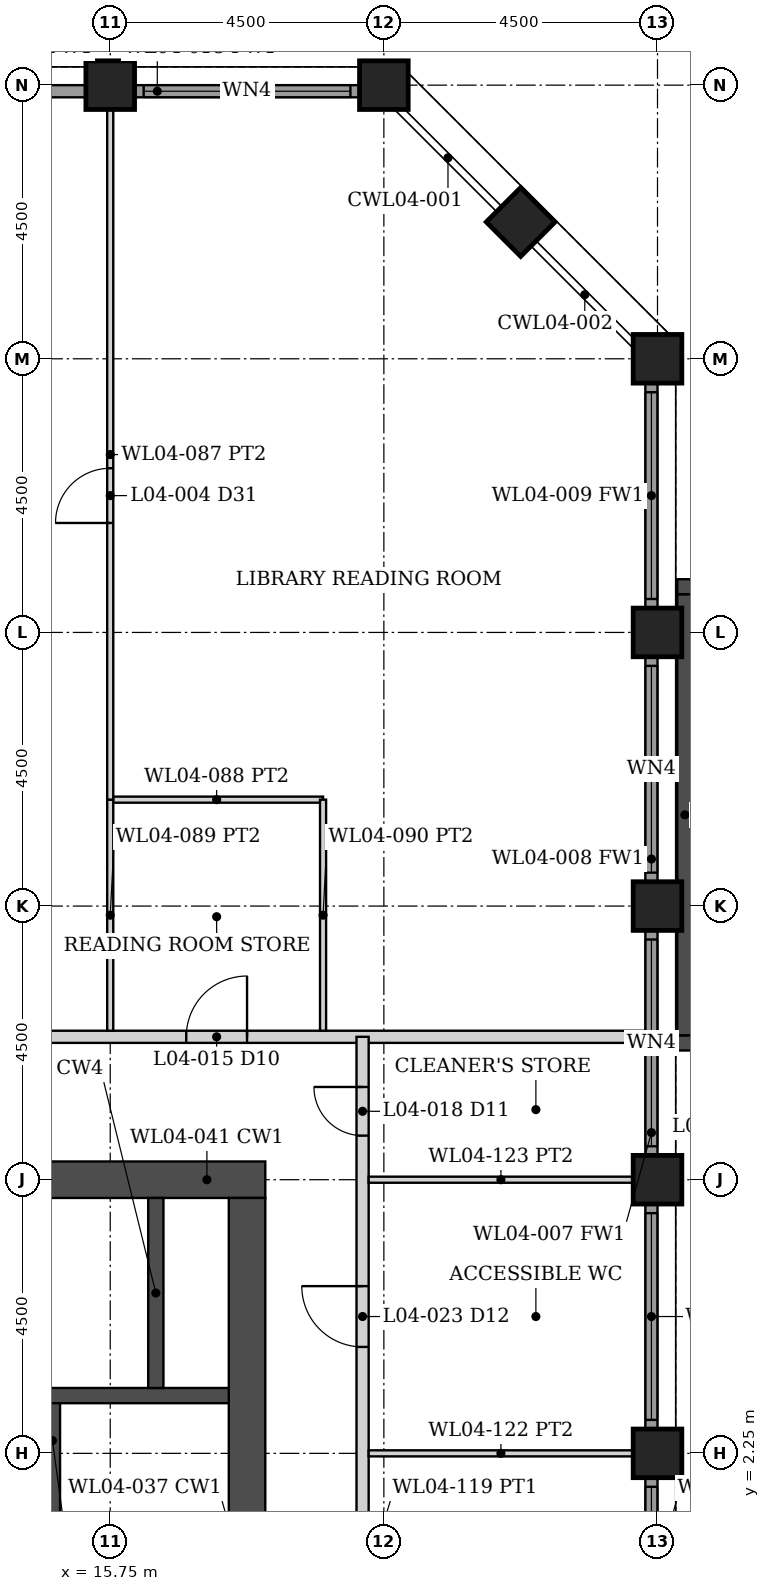
"""IFC4 building model, lengths in metres.
Left out: names, types, materials, properties, quantities, classifications, styles, units other than length and angle.
Written with IfcOpenShell. Run it as: python <this file> out.ifc"""

import sys

from ifc_helpers import new_model, si_unit, direction, frame, frame_2d, origin, origin_2d, place, context, subcontext, project, spatial, rectangle, hollow_rectangle, extrude, element, fill, save


model = new_model("IFC4")
c1 = context("Model", 3, precision=1e-05, world=origin(), true_north=direction((0.0, 1.0)))
c2 = subcontext(c1, "Body", "Model", "MODEL_VIEW")
j1 = project(units=[si_unit("LENGTHUNIT", "METRE"), si_unit("PLANEANGLEUNIT", "RADIAN")], contexts=[c1])
p1 = place(None, origin())
s1 = spatial("IfcSite", under=j1, at=p1, CompositionType="ELEMENT")
p2 = place(p1, origin())
s2 = spatial("IfcBuilding", under=s1, at=p2, CompositionType="ELEMENT")
p3 = place(p2, frame((0.0, 0.0, 21.5)))
s3 = spatial("IfcBuildingStorey", under=s2, at=p3, CompositionType="ELEMENT", Elevation=21.5)
for number, where, z_axis, x_axis in (
    (1, (24.75, 2.25, 0.0), (0.0, 0.0, 1.0), (1.0, 0.0, 0.0)),
    (2, (24.75, 6.75, 0.0), (0.0, 0.0, 1.0), (1.0, 0.0, 0.0)),
    (3, (24.75, 11.25, 0.0), (0.0, 0.0, 1.0), (1.0, 0.0, 0.0)),
    (4, (15.75, 24.75, 0.0), (0.0, 0.0, 1.0), (0.0, 1.0, 0.0)),
    (5, (24.75, 15.75, 0.0), (0.0, 0.0, 1.0), (1.0, 0.0, 0.0)),
    (6, (20.25, 24.75, 0.0), (0.0, 0.0, 1.0), (0.0, 1.0, 0.0)),
    (7, (24.75, 20.25, 0.0), (0.0, 0.0, 1.0), (1.0, 0.0, 0.0)),
    (8, (22.5, 22.5, 0.0), (0.0, 0.0, 1.0), (0.707, 0.707, 0.0)),
):
    element("IfcColumn", number, at=place(p3, frame(where, z_axis=z_axis, x_axis=x_axis)), inside=s3, PredefinedType="COLUMN", context=c2, shape_type="SweptSolid", body=[
        extrude(hollow_rectangle(XDim=0.8, YDim=0.8, WallThickness=0.08, at=origin_2d()), origin(), (0.0, 0.0, 1.0), 5.0),
    ])
p4 = place(p3, frame((8.7, 6.75, 0.0), z_axis=(0.0, 0.0, 1.0), x_axis=(1.0, 0.0, 0.0)))
e9 = element("IfcWall", 9, at=p4, inside=s3, PredefinedType="SHEAR", context=c2, shape_type="SweptSolid", body=[
    extrude(rectangle(XDim=9.6, YDim=0.6, at=frame_2d((4.8, 0.0))), origin(), (0.0, 0.0, 1.0), 5.0),
])
p5 = place(p3, frame((18.0, -6.45, 0.0), z_axis=(0.0, 0.0, 1.0), x_axis=(0.0, 1.0, 0.0)))
e10 = element("IfcWall", 10, at=p5, inside=s3, PredefinedType="SHEAR", context=c2, shape_type="SweptSolid", body=[
    extrude(rectangle(XDim=12.9, YDim=0.6, at=frame_2d((6.45, 0.0))), origin(), (0.0, 0.0, 1.0), 5.0),
])
p6 = place(p3, frame((9.3, 3.2, 0.0), z_axis=(0.0, 0.0, 1.0), x_axis=(1.0, 0.0, 0.0)))
e11 = element("IfcWall", 11, at=p6, inside=s3, PredefinedType="SHEAR", context=c2, shape_type="SweptSolid", body=[
    extrude(rectangle(XDim=8.4, YDim=0.25, at=frame_2d((4.2, 0.0))), origin(), (0.0, 0.0, 1.0), 5.0),
])
p7 = place(p3, frame((16.5, 3.325, 0.0), z_axis=(0.0, 0.0, 1.0), x_axis=(0.0, 1.0, 0.0)))
e12 = element("IfcWall", 12, at=p7, inside=s3, PredefinedType="SHEAR", context=c2, shape_type="SweptSolid", body=[
    extrude(rectangle(XDim=3.125, YDim=0.25, at=frame_2d((1.562, 0.0))), origin(), (0.0, 0.0, 1.0), 5.0),
])
p8 = place(p3, frame((14.8, -3.075, 0.0), z_axis=(0.0, 0.0, 1.0), x_axis=(0.0, 1.0, 0.0)))
e13 = element("IfcWall", 13, at=p8, inside=s3, PredefinedType="SHEAR", context=c2, shape_type="SweptSolid", body=[
    extrude(rectangle(XDim=6.15, YDim=0.25, at=frame_2d((3.075, 0.0))), origin(), (0.0, 0.0, 1.0), 5.0),
])
p9 = place(p3, frame((25.075, 9.0, 0.0), z_axis=(0.0, 0.0, 1.0), x_axis=(1.0, 0.0, 0.0)))
e14 = element("IfcWall", 14, at=p9, inside=s3, PredefinedType="SHEAR", context=c2, shape_type="SweptSolid", body=[
    extrude(rectangle(XDim=3.55, YDim=0.25, at=frame_2d((1.775, 0.0))), origin(), (0.0, 0.0, 1.0), 5.0),
])
p10 = place(p9, frame((0.475, 0.0, 0.0)))
e15 = element("IfcOpeningElement", 15, at=p10, cuts=e14, PredefinedType="OPENING", context=c2, shape_type="SweptSolid", body=[
    extrude(rectangle(XDim=1.2, YDim=2.2, at=frame_2d((0.6, 1.1))), frame((0.0, 0.135, 0.0), z_axis=(0.0, -1.0, 0.0), x_axis=(1.0, 0.0, 0.0)), (0.0, 0.0, 1.0), 0.27),
])
p11 = place(p3, frame((25.075, 16.5, 0.0), z_axis=(0.0, 0.0, 1.0), x_axis=(1.0, 0.0, 0.0)))
e16 = element("IfcWall", 16, at=p11, inside=s3, PredefinedType="SHEAR", context=c2, shape_type="SweptSolid", body=[
    extrude(rectangle(XDim=3.55, YDim=0.25, at=frame_2d((1.775, 0.0))), origin(), (0.0, 0.0, 1.0), 5.0),
])
p12 = place(p3, frame((25.2, 9.125, 0.0), z_axis=(0.0, 0.0, 1.0), x_axis=(0.0, 1.0, 0.0)))
e17 = element("IfcWall", 17, at=p12, inside=s3, PredefinedType="SHEAR", context=c2, shape_type="SweptSolid", body=[
    extrude(rectangle(XDim=7.25, YDim=0.25, at=frame_2d((3.625, 0.0))), origin(), (0.0, 0.0, 1.0), 5.0),
])
p13 = place(p3, frame((24.65, -1.845, 0.0), z_axis=(0.0, 0.0, 1.0), x_axis=(0.0, 1.0, 0.0)))
e18 = element("IfcWall", 18, at=p13, inside=s3, PredefinedType="SOLIDWALL", context=c2, shape_type="SweptSolid", body=[
    extrude(rectangle(XDim=3.69, YDim=0.2, at=frame_2d((1.845, 0.0))), origin(), (0.0, 0.0, 1.0), 3.879),
])
p14 = place(p13, frame((0.145, 0.0, 0.3)))
e19 = element("IfcOpeningElement", 19, at=p14, cuts=e18, PredefinedType="OPENING", context=c2, shape_type="SweptSolid", body=[
    extrude(rectangle(XDim=3.4, YDim=3.429, at=frame_2d((1.7, 1.714))), frame((0.0, 0.11, 0.0), z_axis=(0.0, -1.0, 0.0), x_axis=(1.0, 0.0, 0.0)), (0.0, 0.0, 1.0), 0.22),
])
p15 = place(p3, frame((24.65, 2.655, 0.0), z_axis=(0.0, 0.0, 1.0), x_axis=(0.0, 1.0, 0.0)))
e20 = element("IfcWall", 20, at=p15, inside=s3, PredefinedType="SOLIDWALL", context=c2, shape_type="SweptSolid", body=[
    extrude(rectangle(XDim=3.69, YDim=0.2, at=frame_2d((1.845, 0.0))), origin(), (0.0, 0.0, 1.0), 3.879),
])
p16 = place(p15, frame((0.145, 0.0, 0.3)))
e21 = element("IfcOpeningElement", 21, at=p16, cuts=e20, PredefinedType="OPENING", context=c2, shape_type="SweptSolid", body=[
    extrude(rectangle(XDim=3.4, YDim=3.429, at=frame_2d((1.7, 1.714))), frame((0.0, 0.11, 0.0), z_axis=(0.0, -1.0, 0.0), x_axis=(1.0, 0.0, 0.0)), (0.0, 0.0, 1.0), 0.22),
])
p17 = place(p3, frame((24.65, 7.155, 0.0), z_axis=(0.0, 0.0, 1.0), x_axis=(0.0, 1.0, 0.0)))
e22 = element("IfcWall", 22, at=p17, inside=s3, PredefinedType="SOLIDWALL", context=c2, shape_type="SweptSolid", body=[
    extrude(rectangle(XDim=3.69, YDim=0.2, at=frame_2d((1.845, 0.0))), origin(), (0.0, 0.0, 1.0), 3.879),
])
p18 = place(p17, frame((0.145, 0.0, 0.3)))
e23 = element("IfcOpeningElement", 23, at=p18, cuts=e22, PredefinedType="OPENING", context=c2, shape_type="SweptSolid", body=[
    extrude(rectangle(XDim=3.4, YDim=3.429, at=frame_2d((1.7, 1.714))), frame((0.0, 0.11, 0.0), z_axis=(0.0, -1.0, 0.0), x_axis=(1.0, 0.0, 0.0)), (0.0, 0.0, 1.0), 0.22),
])
p19 = place(p3, frame((24.65, 11.655, 0.0), z_axis=(0.0, 0.0, 1.0), x_axis=(0.0, 1.0, 0.0)))
e24 = element("IfcWall", 24, at=p19, inside=s3, PredefinedType="SOLIDWALL", context=c2, shape_type="SweptSolid", body=[
    extrude(rectangle(XDim=3.69, YDim=0.2, at=frame_2d((1.845, 0.0))), origin(), (0.0, 0.0, 1.0), 3.879),
])
p20 = place(p19, frame((0.145, 0.0, 0.3)))
e25 = element("IfcOpeningElement", 25, at=p20, cuts=e24, PredefinedType="OPENING", context=c2, shape_type="SweptSolid", body=[
    extrude(rectangle(XDim=3.4, YDim=3.429, at=frame_2d((1.7, 1.714))), frame((0.0, 0.11, 0.0), z_axis=(0.0, -1.0, 0.0), x_axis=(1.0, 0.0, 0.0)), (0.0, 0.0, 1.0), 0.22),
])
p21 = place(p3, frame((24.65, 16.155, 0.0), z_axis=(0.0, 0.0, 1.0), x_axis=(0.0, 1.0, 0.0)))
e26 = element("IfcWall", 26, at=p21, inside=s3, PredefinedType="SOLIDWALL", context=c2, shape_type="SweptSolid", body=[
    extrude(rectangle(XDim=3.69, YDim=0.2, at=frame_2d((1.845, 0.0))), origin(), (0.0, 0.0, 1.0), 3.879),
])
p22 = place(p21, frame((0.145, 0.0, 0.3)))
e27 = element("IfcOpeningElement", 27, at=p22, cuts=e26, PredefinedType="OPENING", context=c2, shape_type="SweptSolid", body=[
    extrude(rectangle(XDim=3.4, YDim=3.429, at=frame_2d((1.7, 1.714))), frame((0.0, 0.11, 0.0), z_axis=(0.0, -1.0, 0.0), x_axis=(1.0, 0.0, 0.0)), (0.0, 0.0, 1.0), 0.22),
])
p23 = place(p3, frame((11.655, 24.65, 0.0), z_axis=(0.0, 0.0, 1.0), x_axis=(1.0, 0.0, 0.0)))
e28 = element("IfcWall", 28, at=p23, inside=s3, PredefinedType="SOLIDWALL", context=c2, shape_type="SweptSolid", body=[
    extrude(rectangle(XDim=3.69, YDim=0.2, at=frame_2d((1.845, 0.0))), origin(), (0.0, 0.0, 1.0), 3.879),
])
p24 = place(p23, frame((0.945, 0.0, 0.0)))
e29 = element("IfcOpeningElement", 29, at=p24, cuts=e28, PredefinedType="OPENING", context=c2, shape_type="SweptSolid", body=[
    extrude(rectangle(XDim=1.8, YDim=2.4, at=frame_2d((0.9, 1.2))), frame((0.0, 0.11, 0.0), z_axis=(0.0, -1.0, 0.0), x_axis=(1.0, 0.0, 0.0)), (0.0, 0.0, 1.0), 0.22),
])
p25 = place(p3, frame((16.155, 24.65, 0.0), z_axis=(0.0, 0.0, 1.0), x_axis=(1.0, 0.0, 0.0)))
e30 = element("IfcWall", 30, at=p25, inside=s3, PredefinedType="SOLIDWALL", context=c2, shape_type="SweptSolid", body=[
    extrude(rectangle(XDim=3.69, YDim=0.2, at=frame_2d((1.845, 0.0))), origin(), (0.0, 0.0, 1.0), 3.879),
])
p26 = place(p25, frame((0.145, 0.0, 0.3)))
e31 = element("IfcOpeningElement", 31, at=p26, cuts=e30, PredefinedType="OPENING", context=c2, shape_type="SweptSolid", body=[
    extrude(rectangle(XDim=3.4, YDim=3.429, at=frame_2d((1.7, 1.714))), frame((0.0, 0.11, 0.0), z_axis=(0.0, -1.0, 0.0), x_axis=(1.0, 0.0, 0.0)), (0.0, 0.0, 1.0), 0.22),
])
p27 = place(p3, frame((-24.55, 9.1, 0.0), z_axis=(0.0, 0.0, 1.0), x_axis=(1.0, 0.0, 0.0)))
e32 = element("IfcWall", 32, at=p27, inside=s3, PredefinedType="PARTITIONING", context=c2, shape_type="SweptSolid", body=[
    extrude(rectangle(XDim=49.1, YDim=0.2, at=frame_2d((24.55, 0.0))), origin(), (0.0, 0.0, 1.0), 3.873),
])
p28 = place(p27, frame((6.684, 0.0, 0.0)))
e33 = element("IfcOpeningElement", 33, at=p28, cuts=e32, PredefinedType="OPENING", context=c2, shape_type="SweptSolid", body=[
    extrude(rectangle(XDim=0.9, YDim=2.1, at=frame_2d((0.45, 1.05))), frame((0.0, 0.11, 0.0), z_axis=(0.0, -1.0, 0.0), x_axis=(1.0, 0.0, 0.0)), (0.0, 0.0, 1.0), 0.22),
])
p29 = place(p27, frame((14.06, 0.0, 0.0)))
e34 = element("IfcOpeningElement", 34, at=p29, cuts=e32, PredefinedType="OPENING", context=c2, shape_type="SweptSolid", body=[
    extrude(rectangle(XDim=0.9, YDim=2.1, at=frame_2d((0.45, 1.05))), frame((0.0, 0.11, 0.0), z_axis=(0.0, -1.0, 0.0), x_axis=(1.0, 0.0, 0.0)), (0.0, 0.0, 1.0), 0.22),
])
p30 = place(p27, frame((9.65, 0.0, 0.0)))
e35 = element("IfcOpeningElement", 35, at=p30, cuts=e32, PredefinedType="OPENING", context=c2, shape_type="SweptSolid", body=[
    extrude(rectangle(XDim=0.8, YDim=2.1, at=frame_2d((0.4, 1.05))), frame((0.0, 0.11, 0.0), z_axis=(0.0, -1.0, 0.0), x_axis=(1.0, 0.0, 0.0)), (0.0, 0.0, 1.0), 0.22),
])
p31 = place(p27, frame((25.592, 0.0, 0.0)))
e36 = element("IfcOpeningElement", 36, at=p31, cuts=e32, PredefinedType="OPENING", context=c2, shape_type="SweptSolid", body=[
    extrude(rectangle(XDim=0.9, YDim=2.1, at=frame_2d((0.45, 1.05))), frame((0.0, 0.11, 0.0), z_axis=(0.0, -1.0, 0.0), x_axis=(1.0, 0.0, 0.0)), (0.0, 0.0, 1.0), 0.22),
])
p32 = place(p27, frame((27.368, 0.0, 0.0)))
e37 = element("IfcOpeningElement", 37, at=p32, cuts=e32, PredefinedType="OPENING", context=c2, shape_type="SweptSolid", body=[
    extrude(rectangle(XDim=0.9, YDim=2.1, at=frame_2d((0.45, 1.05))), frame((0.0, 0.11, 0.0), z_axis=(0.0, -1.0, 0.0), x_axis=(1.0, 0.0, 0.0)), (0.0, 0.0, 1.0), 0.22),
])
p33 = place(p27, frame((19.175, 0.0, 0.0)))
e38 = element("IfcOpeningElement", 38, at=p33, cuts=e32, PredefinedType="OPENING", context=c2, shape_type="SweptSolid", body=[
    extrude(rectangle(XDim=1.0, YDim=2.1, at=frame_2d((0.5, 1.05))), frame((0.0, 0.11, 0.0), z_axis=(0.0, -1.0, 0.0), x_axis=(1.0, 0.0, 0.0)), (0.0, 0.0, 1.0), 0.22),
])
p34 = place(p27, frame((22.925, 0.0, 0.0)))
e39 = element("IfcOpeningElement", 39, at=p34, cuts=e32, PredefinedType="OPENING", context=c2, shape_type="SweptSolid", body=[
    extrude(rectangle(XDim=1.0, YDim=2.1, at=frame_2d((0.5, 1.05))), frame((0.0, 0.11, 0.0), z_axis=(0.0, -1.0, 0.0), x_axis=(1.0, 0.0, 0.0)), (0.0, 0.0, 1.0), 0.22),
])
p35 = place(p27, frame((29.65, 0.0, 0.0)))
e40 = element("IfcOpeningElement", 40, at=p35, cuts=e32, PredefinedType="OPENING", context=c2, shape_type="SweptSolid", body=[
    extrude(rectangle(XDim=0.8, YDim=2.1, at=frame_2d((0.4, 1.05))), frame((0.0, 0.11, 0.0), z_axis=(0.0, -1.0, 0.0), x_axis=(1.0, 0.0, 0.0)), (0.0, 0.0, 1.0), 0.22),
])
p36 = place(p27, frame((35.375, 0.0, 0.0)))
e41 = element("IfcOpeningElement", 41, at=p36, cuts=e32, PredefinedType="OPENING", context=c2, shape_type="SweptSolid", body=[
    extrude(rectangle(XDim=0.9, YDim=2.1, at=frame_2d((0.45, 1.05))), frame((0.0, 0.11, 0.0), z_axis=(0.0, -1.0, 0.0), x_axis=(1.0, 0.0, 0.0)), (0.0, 0.0, 1.0), 0.22),
])
p37 = place(p27, frame((41.55, 0.0, 0.0)))
e42 = element("IfcOpeningElement", 42, at=p37, cuts=e32, PredefinedType="OPENING", context=c2, shape_type="SweptSolid", body=[
    extrude(rectangle(XDim=1.0, YDim=2.1, at=frame_2d((0.5, 1.05))), frame((0.0, 0.11, 0.0), z_axis=(0.0, -1.0, 0.0), x_axis=(1.0, 0.0, 0.0)), (0.0, 0.0, 1.0), 0.22),
])
p38 = place(p3, frame((19.9, -9.1, 0.0), z_axis=(0.0, 0.0, 1.0), x_axis=(0.0, 1.0, 0.0)))
e43 = element("IfcWall", 43, at=p38, inside=s3, PredefinedType="PARTITIONING", context=c2, shape_type="SweptSolid", body=[
    extrude(rectangle(XDim=18.2, YDim=0.2, at=frame_2d((9.1, 0.0))), origin(), (0.0, 0.0, 1.0), 3.873),
])
p39 = place(p38, frame((2.975, 0.0, 0.0)))
e44 = element("IfcOpeningElement", 44, at=p39, cuts=e43, PredefinedType="OPENING", context=c2, shape_type="SweptSolid", body=[
    extrude(rectangle(XDim=1.0, YDim=2.1, at=frame_2d((0.5, 1.05))), frame((0.0, 0.11, 0.0), z_axis=(0.0, -1.0, 0.0), x_axis=(1.0, 0.0, 0.0)), (0.0, 0.0, 1.0), 0.22),
])
p40 = place(p38, frame((8.6, 0.0, 0.0)))
e45 = element("IfcOpeningElement", 45, at=p40, cuts=e43, PredefinedType="OPENING", context=c2, shape_type="SweptSolid", body=[
    extrude(rectangle(XDim=1.0, YDim=2.1, at=frame_2d((0.5, 1.05))), frame((0.0, 0.11, 0.0), z_axis=(0.0, -1.0, 0.0), x_axis=(1.0, 0.0, 0.0)), (0.0, 0.0, 1.0), 0.22),
])
p41 = place(p38, frame((13.1, 0.0, 0.0)))
e46 = element("IfcOpeningElement", 46, at=p41, cuts=e43, PredefinedType="OPENING", context=c2, shape_type="SweptSolid", body=[
    extrude(rectangle(XDim=1.0, YDim=2.1, at=frame_2d((0.5, 1.05))), frame((0.0, 0.11, 0.0), z_axis=(0.0, -1.0, 0.0), x_axis=(1.0, 0.0, 0.0)), (0.0, 0.0, 1.0), 0.22),
])
p42 = place(p38, frame((16.575, 0.0, 0.0)))
e47 = element("IfcOpeningElement", 47, at=p42, cuts=e43, PredefinedType="OPENING", context=c2, shape_type="SweptSolid", body=[
    extrude(rectangle(XDim=0.8, YDim=2.1, at=frame_2d((0.4, 1.05))), frame((0.0, 0.11, 0.0), z_axis=(0.0, -1.0, 0.0), x_axis=(1.0, 0.0, 0.0)), (0.0, 0.0, 1.0), 0.22),
])
p43 = place(p3, frame((15.75, 13.0, 0.0), z_axis=(0.0, 0.0, 1.0), x_axis=(1.0, 0.0, 0.0)))
e48 = element("IfcWall", 48, at=p43, inside=s3, PredefinedType="PARTITIONING", context=c2, shape_type="SweptSolid", body=[
    extrude(rectangle(XDim=3.5, YDim=0.1, at=frame_2d((1.75, 0.0))), origin(), (0.0, 0.0, 1.0), 3.873),
])
for number, where, z_axis, x_axis in (
    (49, (15.75, 9.2, 0.0), (0.0, 0.0, 1.0), (0.0, 1.0, 0.0)),
    (50, (19.25, 9.2, 0.0), (0.0, 0.0, 1.0), (0.0, 1.0, 0.0)),
):
    element("IfcWall", number, at=place(p3, frame(where, z_axis=z_axis, x_axis=x_axis)), inside=s3, PredefinedType="PARTITIONING", context=c2, shape_type="SweptSolid", body=[
        extrude(rectangle(XDim=3.8, YDim=0.1, at=frame_2d((1.9, 0.0))), origin(), (0.0, 0.0, 1.0), 3.873),
    ])
p44 = place(p3, frame((15.75, 13.0, 0.0), z_axis=(0.0, 0.0, 1.0), x_axis=(0.0, 1.0, 0.0)))
e51 = element("IfcWall", 51, at=p44, inside=s3, PredefinedType="PARTITIONING", context=c2, shape_type="SweptSolid", body=[
    extrude(rectangle(XDim=11.35, YDim=0.1, at=frame_2d((5.675, 0.0))), origin(), (0.0, 0.0, 1.0), 3.873),
])
p45 = place(p44, frame((4.55, 0.0, 0.0)))
e52 = element("IfcOpeningElement", 52, at=p45, cuts=e51, PredefinedType="OPENING", context=c2, shape_type="SweptSolid", body=[
    extrude(rectangle(XDim=0.9, YDim=2.1, at=frame_2d((0.45, 1.05))), frame((0.0, 0.06, 0.0), z_axis=(0.0, -1.0, 0.0), x_axis=(1.0, 0.0, 0.0)), (0.0, 0.0, 1.0), 0.12),
])
for number, where, z_axis, x_axis in (
    (53, (20.0, 2.25, 0.0), (0.0, 0.0, 1.0), (1.0, 0.0, 0.0)),
    (54, (20.0, 6.75, 0.0), (0.0, 0.0, 1.0), (1.0, 0.0, 0.0)),
):
    element("IfcWall", number, at=place(p3, frame(where, z_axis=z_axis, x_axis=x_axis)), inside=s3, PredefinedType="PARTITIONING", context=c2, shape_type="SweptSolid", body=[
        extrude(rectangle(XDim=4.35, YDim=0.1, at=frame_2d((2.175, 0.0))), origin(), (0.0, 0.0, 1.0), 3.873),
    ])
p46 = place(p14, origin())
e55 = element("IfcWindow", 55, at=p46, inside=s3, PartitioningType="SINGLE_PANEL", PredefinedType="WINDOW", context=c2, shape_type="SweptSolid", body=[
    extrude(rectangle(XDim=3.4, YDim=3.429, at=frame_2d((1.7, 1.714))), frame((0.0, 0.03, 0.0), z_axis=(0.0, -1.0, 0.0), x_axis=(1.0, 0.0, 0.0)), (0.0, 0.0, 1.0), 0.06),
])
fill(e19, e55)
p47 = place(p16, origin())
e56 = element("IfcWindow", 56, at=p47, inside=s3, PartitioningType="SINGLE_PANEL", PredefinedType="WINDOW", context=c2, shape_type="SweptSolid", body=[
    extrude(rectangle(XDim=3.4, YDim=3.429, at=frame_2d((1.7, 1.714))), frame((0.0, 0.03, 0.0), z_axis=(0.0, -1.0, 0.0), x_axis=(1.0, 0.0, 0.0)), (0.0, 0.0, 1.0), 0.06),
])
fill(e21, e56)
p48 = place(p18, origin())
e57 = element("IfcWindow", 57, at=p48, inside=s3, PartitioningType="SINGLE_PANEL", PredefinedType="WINDOW", context=c2, shape_type="SweptSolid", body=[
    extrude(rectangle(XDim=3.4, YDim=3.429, at=frame_2d((1.7, 1.714))), frame((0.0, 0.03, 0.0), z_axis=(0.0, -1.0, 0.0), x_axis=(1.0, 0.0, 0.0)), (0.0, 0.0, 1.0), 0.06),
])
fill(e23, e57)
p49 = place(p20, origin())
e58 = element("IfcWindow", 58, at=p49, inside=s3, PartitioningType="SINGLE_PANEL", PredefinedType="WINDOW", context=c2, shape_type="SweptSolid", body=[
    extrude(rectangle(XDim=3.4, YDim=3.429, at=frame_2d((1.7, 1.714))), frame((0.0, 0.03, 0.0), z_axis=(0.0, -1.0, 0.0), x_axis=(1.0, 0.0, 0.0)), (0.0, 0.0, 1.0), 0.06),
])
fill(e25, e58)
p50 = place(p22, origin())
e59 = element("IfcWindow", 59, at=p50, inside=s3, PartitioningType="SINGLE_PANEL", PredefinedType="WINDOW", context=c2, shape_type="SweptSolid", body=[
    extrude(rectangle(XDim=3.4, YDim=3.429, at=frame_2d((1.7, 1.714))), frame((0.0, 0.03, 0.0), z_axis=(0.0, -1.0, 0.0), x_axis=(1.0, 0.0, 0.0)), (0.0, 0.0, 1.0), 0.06),
])
fill(e27, e59)
p51 = place(p26, origin())
e60 = element("IfcWindow", 60, at=p51, inside=s3, PartitioningType="SINGLE_PANEL", PredefinedType="WINDOW", context=c2, shape_type="SweptSolid", body=[
    extrude(rectangle(XDim=3.4, YDim=3.429, at=frame_2d((1.7, 1.714))), frame((0.0, 0.03, 0.0), z_axis=(0.0, -1.0, 0.0), x_axis=(1.0, 0.0, 0.0)), (0.0, 0.0, 1.0), 0.06),
])
fill(e31, e60)
p52 = place(p37, origin())
e61 = element("IfcDoor", 61, at=p52, inside=s3, OperationType="SINGLE_SWING_RIGHT", PredefinedType="DOOR", context=c2, shape_type="SweptSolid", body=[
    extrude(rectangle(XDim=1.0, YDim=2.1, at=frame_2d((0.5, 1.05))), frame((0.0, 0.025, 0.0), z_axis=(0.0, -1.0, 0.0), x_axis=(1.0, 0.0, 0.0)), (0.0, 0.0, 1.0), 0.05),
])
fill(e42, e61)
p53 = place(p45, origin())
e62 = element("IfcDoor", 62, at=p53, inside=s3, OperationType="SINGLE_SWING_LEFT", PredefinedType="DOOR", context=c2, shape_type="SweptSolid", body=[
    extrude(rectangle(XDim=0.9, YDim=2.1, at=frame_2d((0.45, 1.05))), frame((0.0, 0.025, 0.0), z_axis=(0.0, -1.0, 0.0), x_axis=(1.0, 0.0, 0.0)), (0.0, 0.0, 1.0), 0.05),
])
fill(e52, e62)
p54 = place(p41, origin())
e63 = element("IfcDoor", 63, at=p54, inside=s3, OperationType="SINGLE_SWING_RIGHT", PredefinedType="DOOR", context=c2, shape_type="SweptSolid", body=[
    extrude(rectangle(XDim=1.0, YDim=2.1, at=frame_2d((0.5, 1.05))), frame((0.0, 0.025, 0.0), z_axis=(0.0, -1.0, 0.0), x_axis=(1.0, 0.0, 0.0)), (0.0, 0.0, 1.0), 0.05),
])
fill(e46, e63)
p55 = place(p42, origin())
e64 = element("IfcDoor", 64, at=p55, inside=s3, OperationType="SINGLE_SWING_RIGHT", PredefinedType="DOOR", context=c2, shape_type="SweptSolid", body=[
    extrude(rectangle(XDim=0.8, YDim=2.1, at=frame_2d((0.4, 1.05))), frame((0.0, 0.025, 0.0), z_axis=(0.0, -1.0, 0.0), x_axis=(1.0, 0.0, 0.0)), (0.0, 0.0, 1.0), 0.05),
])
fill(e47, e64)
save(model, sys.argv[1])
